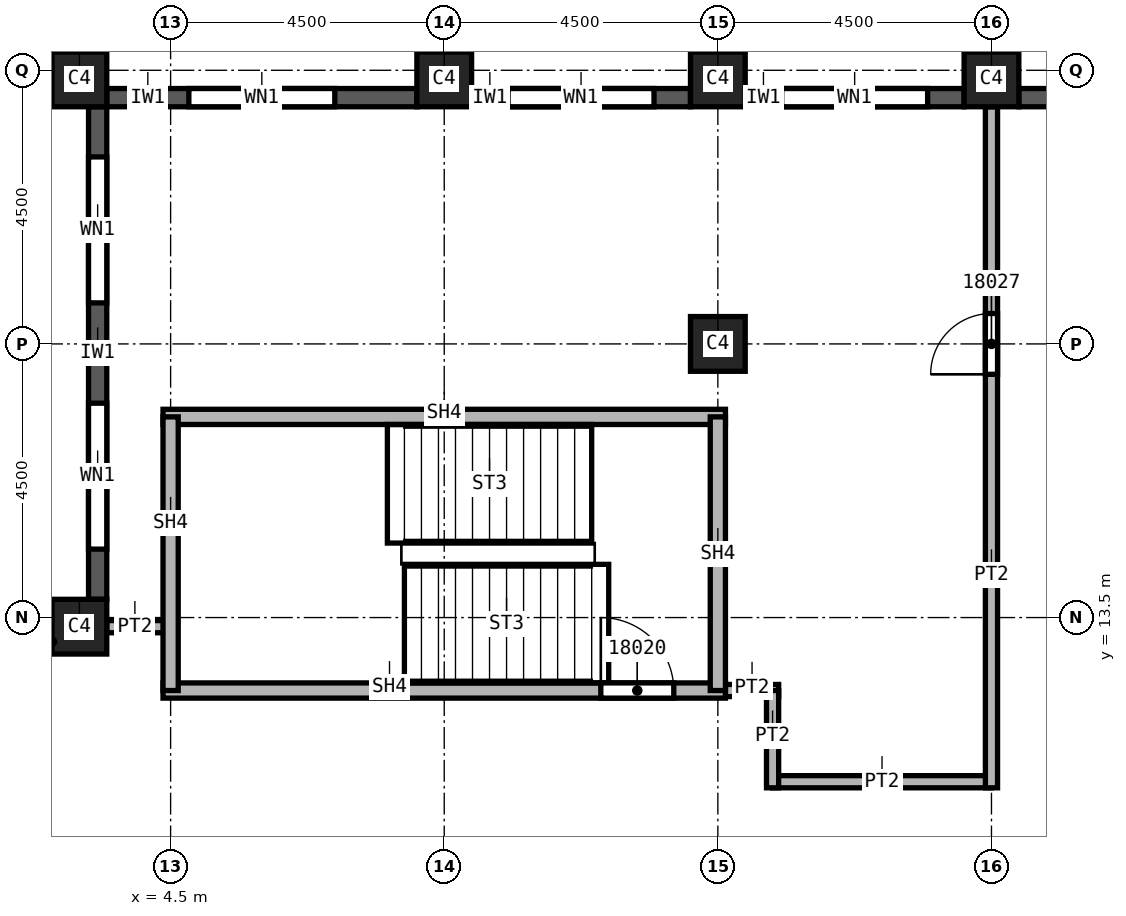
"""IFC4 building model, lengths in metres.
Left out: names, types, materials, properties, quantities, classifications, styles, units other than length and angle.
Written with IfcOpenShell. Run it as: python <this file> out.ifc"""

import sys

from ifc_helpers import new_model, si_unit, direction, frame, frame_2d, origin, origin_2d, place, context, subcontext, project, spatial, rectangle, extrude, element, fill, save


model = new_model("IFC4")
c1 = context("Model", 3, precision=1e-05, world=origin(), true_north=direction((0.0, 1.0)))
c2 = subcontext(c1, "Body", "Model", "MODEL_VIEW")
j1 = project(units=[si_unit("LENGTHUNIT", "METRE"), si_unit("PLANEANGLEUNIT", "RADIAN")], contexts=[c1])
p1 = place(None, origin())
s1 = spatial("IfcSite", under=j1, at=p1, CompositionType="ELEMENT")
p2 = place(p1, origin())
s2 = spatial("IfcBuilding", under=s1, at=p2, CompositionType="ELEMENT")
p3 = place(p2, frame((0.0, 0.0, 266.0)))
s3 = spatial("IfcBuildingStorey", under=s2, at=p3, CompositionType="ELEMENT", Elevation=266.0)
for number, where, z_axis, x_axis in (
    (1, (13.5, 18.0, 0.0), (0.0, 0.0, 1.0), (1.0, 0.0, 0.0)),
    (2, (3.0, 22.35, 0.0), (0.0, 0.0, 1.0), (1.0, 0.0, 0.0)),
    (3, (9.0, 22.35, 0.0), (0.0, 0.0, 1.0), (1.0, 0.0, 0.0)),
    (4, (13.5, 22.35, 0.0), (0.0, 0.0, 1.0), (1.0, 0.0, 0.0)),
    (5, (18.0, 22.35, 0.0), (0.0, 0.0, 1.0), (1.0, 0.0, 0.0)),
    (6, (3.0, 13.35, 0.0), (0.0, 0.0, 1.0), (1.0, 0.0, 0.0)),
):
    element("IfcColumn", number, at=place(p3, frame(where, z_axis=z_axis, x_axis=x_axis)), inside=s3, PredefinedType="COLUMN", context=c2, shape_type="SweptSolid", body=[
        extrude(rectangle(XDim=0.9, YDim=0.9, at=origin_2d()), origin(), (0.0, 0.0, 1.0), 3.72),
    ])
p4 = place(p3, frame((22.05, 22.05, 0.0), z_axis=(0.0, 0.0, 1.0), x_axis=(-1.0, 0.0, 0.0)))
e7 = element("IfcWall", 7, at=p4, inside=s3, PredefinedType="SOLIDWALL", context=c2, shape_type="SweptSolid", body=[
    extrude(rectangle(XDim=3.6, YDim=0.3, at=frame_2d((1.8, 0.0))), origin(), (0.0, 0.0, 1.0), 3.12),
])
p5 = place(p4, frame((0.775, 0.0, 0.8)))
e8 = element("IfcOpeningElement", 8, at=p5, cuts=e7, PredefinedType="OPENING", context=c2, shape_type="SweptSolid", body=[
    extrude(rectangle(XDim=1.0, YDim=1.95, at=frame_2d((0.5, 0.975))), frame((0.0, 0.15, 0.0), z_axis=(0.0, -1.0, 0.0), x_axis=(1.0, 0.0, 0.0)), (0.0, 0.0, 1.0), 0.3),
])
p6 = place(p4, frame((2.375, 0.0, 0.8)))
e9 = element("IfcOpeningElement", 9, at=p6, cuts=e7, PredefinedType="OPENING", context=c2, shape_type="SweptSolid", body=[
    extrude(rectangle(XDim=0.6, YDim=1.95, at=frame_2d((0.3, 0.975))), frame((0.0, 0.15, 0.0), z_axis=(0.0, -1.0, 0.0), x_axis=(1.0, 0.0, 0.0)), (0.0, 0.0, 1.0), 0.3),
])
p7 = place(p3, frame((17.55, 22.05, 0.0), z_axis=(0.0, 0.0, 1.0), x_axis=(-1.0, 0.0, 0.0)))
e10 = element("IfcWall", 10, at=p7, inside=s3, PredefinedType="SOLIDWALL", context=c2, shape_type="SweptSolid", body=[
    extrude(rectangle(XDim=3.6, YDim=0.3, at=frame_2d((1.8, 0.0))), origin(), (0.0, 0.0, 1.0), 3.12),
])
p8 = place(p7, frame((0.6, 0.0, 0.8)))
e11 = element("IfcOpeningElement", 11, at=p8, cuts=e10, PredefinedType="OPENING", context=c2, shape_type="SweptSolid", body=[
    extrude(rectangle(XDim=2.4, YDim=1.95, at=frame_2d((1.2, 0.975))), frame((0.0, 0.15, 0.0), z_axis=(0.0, -1.0, 0.0), x_axis=(1.0, 0.0, 0.0)), (0.0, 0.0, 1.0), 0.3),
])
p9 = place(p3, frame((13.05, 22.05, 0.0), z_axis=(0.0, 0.0, 1.0), x_axis=(-1.0, 0.0, 0.0)))
e12 = element("IfcWall", 12, at=p9, inside=s3, PredefinedType="SOLIDWALL", context=c2, shape_type="SweptSolid", body=[
    extrude(rectangle(XDim=3.6, YDim=0.3, at=frame_2d((1.8, 0.0))), origin(), (0.0, 0.0, 1.0), 3.12),
])
p10 = place(p9, frame((0.6, 0.0, 0.8)))
e13 = element("IfcOpeningElement", 13, at=p10, cuts=e12, PredefinedType="OPENING", context=c2, shape_type="SweptSolid", body=[
    extrude(rectangle(XDim=2.4, YDim=1.95, at=frame_2d((1.2, 0.975))), frame((0.0, 0.15, 0.0), z_axis=(0.0, -1.0, 0.0), x_axis=(1.0, 0.0, 0.0)), (0.0, 0.0, 1.0), 0.3),
])
p11 = place(p3, frame((8.55, 22.05, 0.0), z_axis=(0.0, 0.0, 1.0), x_axis=(-1.0, 0.0, 0.0)))
e14 = element("IfcWall", 14, at=p11, inside=s3, PredefinedType="SOLIDWALL", context=c2, shape_type="SweptSolid", body=[
    extrude(rectangle(XDim=5.1, YDim=0.3, at=frame_2d((2.55, 0.0))), origin(), (0.0, 0.0, 1.0), 3.12),
])
p12 = place(p11, frame((1.35, 0.0, 0.8)))
e15 = element("IfcOpeningElement", 15, at=p12, cuts=e14, PredefinedType="OPENING", context=c2, shape_type="SweptSolid", body=[
    extrude(rectangle(XDim=2.4, YDim=1.95, at=frame_2d((1.2, 0.975))), frame((0.0, 0.15, 0.0), z_axis=(0.0, -1.0, 0.0), x_axis=(1.0, 0.0, 0.0)), (0.0, 0.0, 1.0), 0.3),
])
p13 = place(p3, frame((3.3, 21.9, 0.0), z_axis=(0.0, 0.0, 1.0), x_axis=(0.0, -1.0, 0.0)))
e16 = element("IfcWall", 16, at=p13, inside=s3, PredefinedType="SOLIDWALL", context=c2, shape_type="SweptSolid", body=[
    extrude(rectangle(XDim=8.1, YDim=0.3, at=frame_2d((4.05, 0.0))), origin(), (0.0, 0.0, 1.0), 3.12),
])
p14 = place(p13, frame((0.825, 0.0, 0.8)))
e17 = element("IfcOpeningElement", 17, at=p14, cuts=e16, PredefinedType="OPENING", context=c2, shape_type="SweptSolid", body=[
    extrude(rectangle(XDim=2.4, YDim=1.95, at=frame_2d((1.2, 0.975))), frame((0.0, 0.15, 0.0), z_axis=(0.0, -1.0, 0.0), x_axis=(1.0, 0.0, 0.0)), (0.0, 0.0, 1.0), 0.3),
])
p15 = place(p13, frame((4.875, 0.0, 0.8)))
e18 = element("IfcOpeningElement", 18, at=p15, cuts=e16, PredefinedType="OPENING", context=c2, shape_type="SweptSolid", body=[
    extrude(rectangle(XDim=2.4, YDim=1.95, at=frame_2d((1.2, 0.975))), frame((0.0, 0.15, 0.0), z_axis=(0.0, -1.0, 0.0), x_axis=(1.0, 0.0, 0.0)), (0.0, 0.0, 1.0), 0.3),
])
p16 = place(p3, frame((3.45, 13.35, 0.0), z_axis=(0.0, 0.0, 1.0), x_axis=(1.0, 0.0, 0.0)))
e19 = element("IfcWall", 19, at=p16, inside=s3, PredefinedType="PARTITIONING", context=c2, shape_type="SweptSolid", body=[
    extrude(rectangle(XDim=1.05, YDim=0.2, at=frame_2d((0.525, 0.0))), origin(), (0.0, 0.0, 1.0), 3.72),
])
p17 = place(p3, frame((13.375, 12.3, 0.0), z_axis=(0.0, 0.0, 1.0), x_axis=(1.0, 0.0, 0.0)))
e20 = element("IfcWall", 20, at=p17, inside=s3, PredefinedType="PARTITIONING", context=c2, shape_type="SweptSolid", body=[
    extrude(rectangle(XDim=1.125, YDim=0.2, at=frame_2d((0.562, 0.0))), origin(), (0.0, 0.0, 1.0), 3.72),
])
p18 = place(p3, frame((14.4, 10.8, 0.0), z_axis=(0.0, 0.0, 1.0), x_axis=(1.0, 0.0, 0.0)))
e21 = element("IfcWall", 21, at=p18, inside=s3, PredefinedType="PARTITIONING", context=c2, shape_type="SweptSolid", body=[
    extrude(rectangle(XDim=3.6, YDim=0.2, at=frame_2d((1.8, 0.0))), origin(), (0.0, 0.0, 1.0), 3.72),
])
p19 = place(p3, frame((14.4, 12.3, 0.0), z_axis=(0.0, 0.0, 1.0), x_axis=(0.0, -1.0, 0.0)))
e22 = element("IfcWall", 22, at=p19, inside=s3, PredefinedType="PARTITIONING", context=c2, shape_type="SweptSolid", body=[
    extrude(rectangle(XDim=1.6, YDim=0.2, at=frame_2d((0.8, 0.0))), origin(), (0.0, 0.0, 1.0), 3.72),
])
p20 = place(p3, frame((18.0, 10.7, 0.0), z_axis=(0.0, 0.0, 1.0), x_axis=(0.0, 1.0, 0.0)))
e23 = element("IfcWall", 23, at=p20, inside=s3, PredefinedType="PARTITIONING", context=c2, shape_type="SweptSolid", body=[
    extrude(rectangle(XDim=11.2, YDim=0.2, at=frame_2d((5.6, 0.0))), origin(), (0.0, 0.0, 1.0), 3.72),
])
p21 = place(p20, frame((6.8, 0.0, 0.0)))
e24 = element("IfcOpeningElement", 24, at=p21, cuts=e23, PredefinedType="OPENING", context=c2, shape_type="SweptSolid", body=[
    extrude(rectangle(XDim=1.0, YDim=2.1, at=frame_2d((0.5, 1.05))), frame((0.0, 0.1, 0.0), z_axis=(0.0, -1.0, 0.0), x_axis=(1.0, 0.0, 0.0)), (0.0, 0.0, 1.0), 0.2),
])
p22 = place(p3, frame((4.375, 12.3, 0.0), z_axis=(0.0, 0.0, 1.0), x_axis=(1.0, 0.0, 0.0)))
e25 = element("IfcWall", 25, at=p22, inside=s3, PredefinedType="SOLIDWALL", context=c2, shape_type="SweptSolid", body=[
    extrude(rectangle(XDim=9.25, YDim=0.25, at=frame_2d((4.625, 0.0))), origin(), (0.0, 0.0, 1.0), 3.72),
])
p23 = place(p22, frame((7.2, 0.0, 0.0)))
e26 = element("IfcOpeningElement", 26, at=p23, cuts=e25, PredefinedType="OPENING", context=c2, shape_type="SweptSolid", body=[
    extrude(rectangle(XDim=1.2, YDim=2.1, at=frame_2d((0.6, 1.05))), frame((0.0, 0.125, 0.0), z_axis=(0.0, -1.0, 0.0), x_axis=(1.0, 0.0, 0.0)), (0.0, 0.0, 1.0), 0.25),
])
p24 = place(p3, frame((4.375, 16.8, 0.0), z_axis=(0.0, 0.0, 1.0), x_axis=(1.0, 0.0, 0.0)))
e27 = element("IfcWall", 27, at=p24, inside=s3, PredefinedType="SOLIDWALL", context=c2, shape_type="SweptSolid", body=[
    extrude(rectangle(XDim=9.25, YDim=0.25, at=frame_2d((4.625, 0.0))), origin(), (0.0, 0.0, 1.0), 3.72),
])
for number, where, z_axis, x_axis in (
    (28, (4.5, 12.3, 0.0), (0.0, 0.0, 1.0), (0.0, 1.0, 0.0)),
    (29, (13.5, 16.8, 0.0), (0.0, 0.0, 1.0), (0.0, -1.0, 0.0)),
):
    element("IfcWall", number, at=place(p3, frame(where, z_axis=z_axis, x_axis=x_axis)), inside=s3, PredefinedType="SOLIDWALL", context=c2, shape_type="SweptSolid", body=[
        extrude(rectangle(XDim=4.5, YDim=0.25, at=frame_2d((2.25, 0.0))), origin(), (0.0, 0.0, 1.0), 3.72),
    ])
p25 = place(p8, origin())
e30 = element("IfcWindow", 30, at=p25, inside=s3, PartitioningType="SINGLE_PANEL", PredefinedType="WINDOW", context=c2, shape_type="SweptSolid", body=[
    extrude(rectangle(XDim=2.4, YDim=1.95, at=frame_2d((1.2, 0.975))), frame((0.0, 0.03, 0.0), z_axis=(0.0, -1.0, 0.0), x_axis=(1.0, 0.0, 0.0)), (0.0, 0.0, 1.0), 0.06),
])
fill(e11, e30)
p26 = place(p10, origin())
e31 = element("IfcWindow", 31, at=p26, inside=s3, PartitioningType="SINGLE_PANEL", PredefinedType="WINDOW", context=c2, shape_type="SweptSolid", body=[
    extrude(rectangle(XDim=2.4, YDim=1.95, at=frame_2d((1.2, 0.975))), frame((0.0, 0.03, 0.0), z_axis=(0.0, -1.0, 0.0), x_axis=(1.0, 0.0, 0.0)), (0.0, 0.0, 1.0), 0.06),
])
fill(e13, e31)
p27 = place(p12, origin())
e32 = element("IfcWindow", 32, at=p27, inside=s3, PartitioningType="SINGLE_PANEL", PredefinedType="WINDOW", context=c2, shape_type="SweptSolid", body=[
    extrude(rectangle(XDim=2.4, YDim=1.95, at=frame_2d((1.2, 0.975))), frame((0.0, 0.03, 0.0), z_axis=(0.0, -1.0, 0.0), x_axis=(1.0, 0.0, 0.0)), (0.0, 0.0, 1.0), 0.06),
])
fill(e15, e32)
p28 = place(p14, origin())
e33 = element("IfcWindow", 33, at=p28, inside=s3, PartitioningType="SINGLE_PANEL", PredefinedType="WINDOW", context=c2, shape_type="SweptSolid", body=[
    extrude(rectangle(XDim=2.4, YDim=1.95, at=frame_2d((1.2, 0.975))), frame((0.0, 0.03, 0.0), z_axis=(0.0, -1.0, 0.0), x_axis=(1.0, 0.0, 0.0)), (0.0, 0.0, 1.0), 0.06),
])
fill(e17, e33)
p29 = place(p15, origin())
e34 = element("IfcWindow", 34, at=p29, inside=s3, PartitioningType="SINGLE_PANEL", PredefinedType="WINDOW", context=c2, shape_type="SweptSolid", body=[
    extrude(rectangle(XDim=2.4, YDim=1.95, at=frame_2d((1.2, 0.975))), frame((0.0, 0.03, 0.0), z_axis=(0.0, -1.0, 0.0), x_axis=(1.0, 0.0, 0.0)), (0.0, 0.0, 1.0), 0.06),
])
fill(e18, e34)
p30 = place(p23, origin())
e35 = element("IfcDoor", 35, at=p30, inside=s3, OperationType="SINGLE_SWING_LEFT", PredefinedType="DOOR", context=c2, shape_type="SweptSolid", body=[
    extrude(rectangle(XDim=1.2, YDim=2.1, at=frame_2d((0.6, 1.05))), frame((0.0, 0.025, 0.0), z_axis=(0.0, -1.0, 0.0), x_axis=(1.0, 0.0, 0.0)), (0.0, 0.0, 1.0), 0.05),
])
fill(e26, e35)
p31 = place(p21, origin())
e36 = element("IfcDoor", 36, at=p31, inside=s3, OperationType="SINGLE_SWING_RIGHT", PredefinedType="DOOR", context=c2, shape_type="SweptSolid", body=[
    extrude(rectangle(XDim=1.0, YDim=2.1, at=frame_2d((0.5, 1.05))), frame((0.0, 0.025, 0.0), z_axis=(0.0, -1.0, 0.0), x_axis=(1.0, 0.0, 0.0)), (0.0, 0.0, 1.0), 0.05),
])
fill(e24, e36)
save(model, sys.argv[1])
